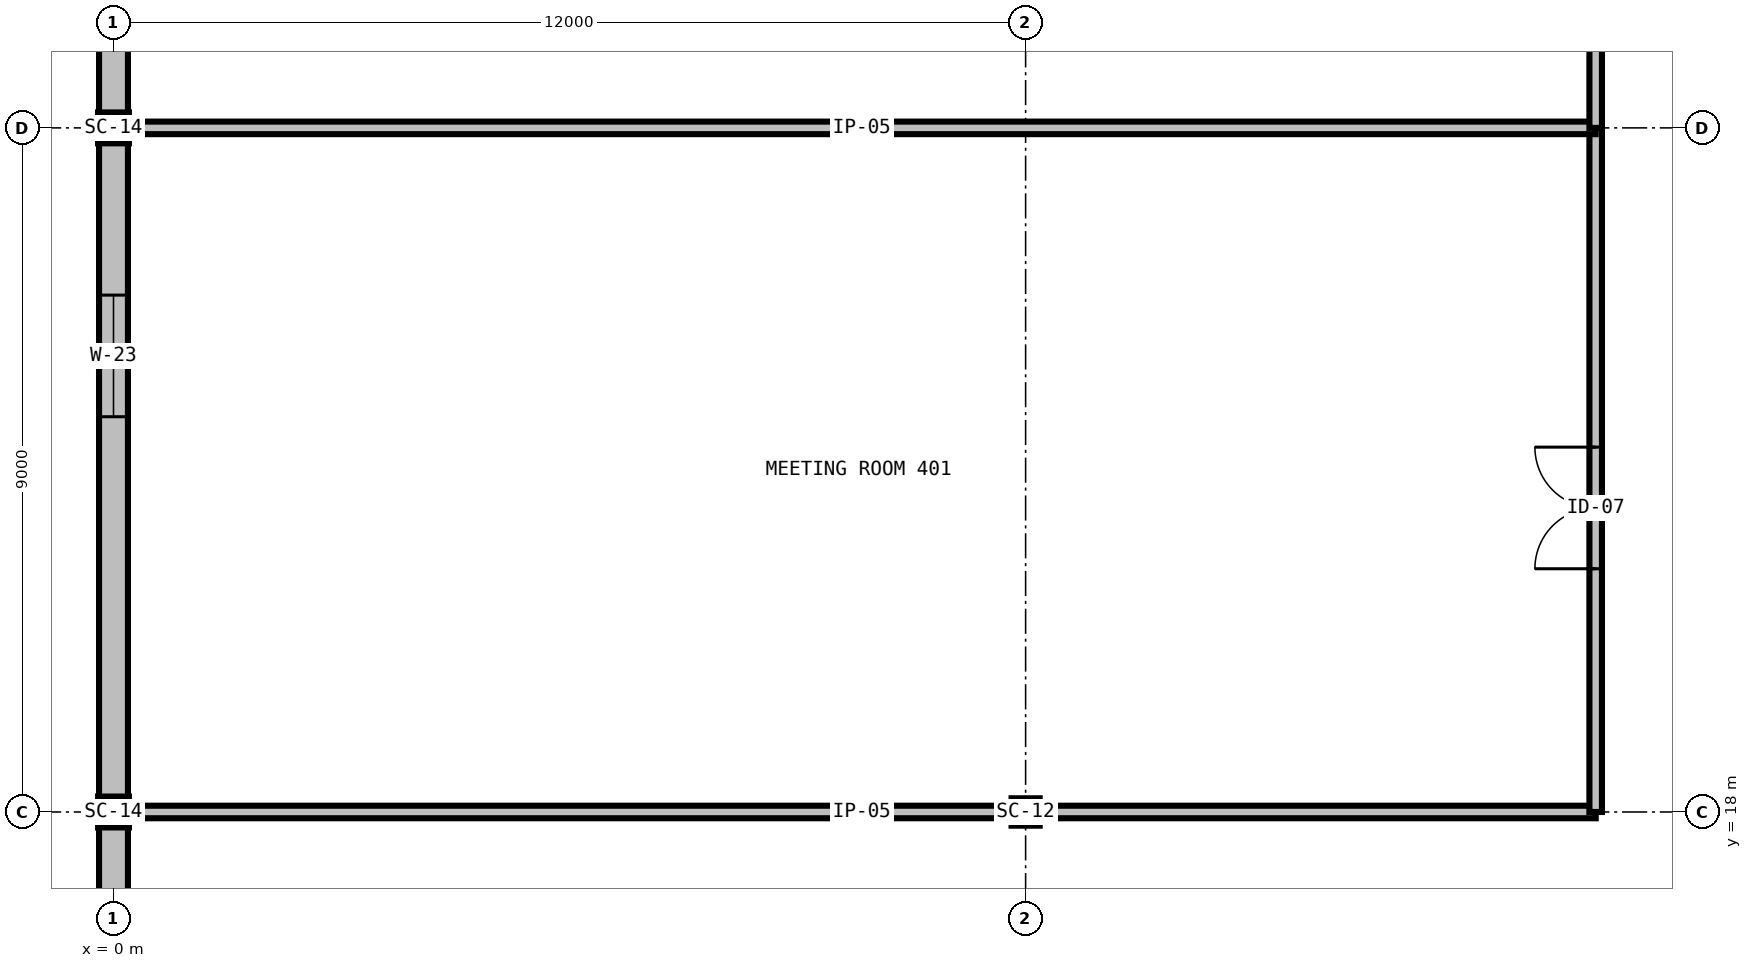
"""IFC4 building model, lengths in metres.
Left out: names, types, materials, properties, quantities, classifications, styles, units other than length and angle.
Written with IfcOpenShell. Run it as: python <this file> out.ifc"""

import sys

from ifc_helpers import new_model, si_unit, direction, frame, frame_2d, origin, origin_2d, place, context, subcontext, project, spatial, rectangle, hollow_rectangle, i_section, extrude, element, fill, save


model = new_model("IFC4")
c1 = context("Model", 3, precision=1e-05, world=origin(), true_north=direction((0.0, 1.0)))
c2 = subcontext(c1, "Body", "Model", "MODEL_VIEW")
j1 = project(units=[si_unit("LENGTHUNIT", "METRE"), si_unit("PLANEANGLEUNIT", "RADIAN")], contexts=[c1])
p1 = place(None, origin())
s1 = spatial("IfcSite", under=j1, at=p1, CompositionType="ELEMENT")
p2 = place(p1, origin())
s2 = spatial("IfcBuilding", under=s1, at=p2, CompositionType="ELEMENT")
p3 = place(p2, frame((0.0, 0.0, 23.4)))
s3 = spatial("IfcBuildingStorey", under=s2, at=p3, CompositionType="ELEMENT", Elevation=23.4)
for number, where, z_axis, x_axis in (
    (1, (0.0, 18.0, 0.0), (0.0, 0.0, 1.0), (1.0, 0.0, 0.0)),
    (2, (0.0, 27.0, 0.0), (0.0, 0.0, 1.0), (1.0, 0.0, 0.0)),
):
    element("IfcColumn", number, at=place(p3, frame(where, z_axis=z_axis, x_axis=x_axis)), inside=s3, PredefinedType="COLUMN", context=c2, shape_type="SweptSolid", body=[
        extrude(hollow_rectangle(XDim=0.406, YDim=0.406, WallThickness=0.015, at=origin_2d()), origin(), (0.0, 0.0, 1.0), 3.53),
    ])
p4 = place(p3, frame((12.0, 18.0, 0.0), z_axis=(0.0, 0.0, 1.0), x_axis=(1.0, 0.0, 0.0)))
e3 = element("IfcColumn", 3, at=p4, inside=s3, PredefinedType="COLUMN", context=c2, shape_type="SweptSolid", body=[
    extrude(i_section(OverallWidth=0.37, OverallDepth=0.36, WebThickness=0.012, FlangeThickness=0.02, FilletRadius=0.031, at=origin_2d()), origin(), (0.0, 0.0, 1.0), 3.85),
])
p5 = place(p3, frame((0.0, 18.0, 0.0), z_axis=(0.0, 0.0, 1.0), x_axis=(0.0, -1.0, 0.0)))
e4 = element("IfcWall", 4, at=p5, inside=s3, PredefinedType="STANDARD", context=c2, shape_type="SweptSolid", body=[
    extrude(rectangle(XDim=9.0, YDim=0.38, at=frame_2d((4.5, 0.0))), origin(), (0.0, 0.0, 1.0), 3.119),
])
p6 = place(p3, frame((0.0, 27.0, 0.0), z_axis=(0.0, 0.0, 1.0), x_axis=(0.0, -1.0, 0.0)))
e5 = element("IfcWall", 5, at=p6, inside=s3, PredefinedType="STANDARD", context=c2, shape_type="SweptSolid", body=[
    extrude(rectangle(XDim=9.0, YDim=0.38, at=frame_2d((4.5, 0.0))), origin(), (0.0, 0.0, 1.0), 3.119),
])
p7 = place(p6, frame((2.2, 0.0, 1.0)))
e6 = element("IfcOpeningElement", 6, at=p7, cuts=e5, PredefinedType="OPENING", context=c2, shape_type="SweptSolid", body=[
    extrude(rectangle(XDim=1.6, YDim=1.36, at=frame_2d((0.8, 0.68))), frame((0.0, 0.205, 0.0), z_axis=(0.0, -1.0, 0.0), x_axis=(1.0, 0.0, 0.0)), (0.0, 0.0, 1.0), 0.41),
])
p8 = place(p3, frame((0.0, 36.0, 0.0), z_axis=(0.0, 0.0, 1.0), x_axis=(0.0, -1.0, 0.0)))
e7 = element("IfcWall", 7, at=p8, inside=s3, PredefinedType="STANDARD", context=c2, shape_type="SweptSolid", body=[
    extrude(rectangle(XDim=9.0, YDim=0.38, at=frame_2d((4.5, 0.0))), origin(), (0.0, 0.0, 1.0), 3.119),
])
p9 = place(p8, frame((2.2, 0.0, 1.0)))
e8 = element("IfcOpeningElement", 8, at=p9, cuts=e7, PredefinedType="OPENING", context=c2, shape_type="SweptSolid", body=[
    extrude(rectangle(XDim=1.6, YDim=1.36, at=frame_2d((0.8, 0.68))), frame((0.0, 0.205, 0.0), z_axis=(0.0, -1.0, 0.0), x_axis=(1.0, 0.0, 0.0)), (0.0, 0.0, 1.0), 0.41),
])
p10 = place(p3, frame((0.14, 116.72, 3.85), z_axis=(0.0, 0.0, 1.0), x_axis=(0.0, -1.0, 0.0)))
e9 = element("IfcWall", 9, at=p10, inside=s3, PredefinedType="PARAPET", context=c2, shape_type="SweptSolid", body=[
    extrude(rectangle(XDim=116.44, YDim=0.28, at=frame_2d((58.22, 0.0))), origin(), (0.0, 0.0, 1.0), 1.2),
])
p11 = place(p3, frame((0.19, 18.0, 0.0), z_axis=(0.0, 0.0, 1.0), x_axis=(1.0, 0.0, 0.0)))
e10 = element("IfcWall", 10, at=p11, inside=s3, PredefinedType="PARTITIONING", context=c2, shape_type="SweptSolid", body=[
    extrude(rectangle(XDim=19.31, YDim=0.165, at=frame_2d((9.655, 0.0))), origin(), (0.0, 0.0, 1.0), 2.752),
])
p12 = place(p3, frame((19.5, 18.0, 0.0), z_axis=(0.0, 0.0, 1.0), x_axis=(0.0, 1.0, 0.0)))
e11 = element("IfcWall", 11, at=p12, inside=s3, PredefinedType="PARTITIONING", context=c2, shape_type="SweptSolid", body=[
    extrude(rectangle(XDim=9.0, YDim=0.165, at=frame_2d((4.5, 0.0))), origin(), (0.0, 0.0, 1.0), 3.53),
])
p13 = place(p12, frame((3.2, 0.0, 0.0)))
e12 = element("IfcOpeningElement", 12, at=p13, cuts=e11, PredefinedType="OPENING", context=c2, shape_type="SweptSolid", body=[
    extrude(rectangle(XDim=1.6, YDim=2.25, at=frame_2d((0.8, 1.125))), frame((0.0, 0.098, 0.0), z_axis=(0.0, -1.0, 0.0), x_axis=(1.0, 0.0, 0.0)), (0.0, 0.0, 1.0), 0.195),
])
p14 = place(p3, frame((19.5, 27.0, 0.0), z_axis=(0.0, 0.0, 1.0), x_axis=(-1.0, 0.0, 0.0)))
e13 = element("IfcWall", 13, at=p14, inside=s3, PredefinedType="PARTITIONING", context=c2, shape_type="SweptSolid", body=[
    extrude(rectangle(XDim=19.31, YDim=0.165, at=frame_2d((9.655, 0.0))), origin(), (0.0, 0.0, 1.0), 2.408),
])
p15 = place(p3, frame((19.5, 27.0, 0.0), z_axis=(0.0, 0.0, 1.0), x_axis=(0.0, 1.0, 0.0)))
e14 = element("IfcWall", 14, at=p15, inside=s3, PredefinedType="PARTITIONING", context=c2, shape_type="SweptSolid", body=[
    extrude(rectangle(XDim=18.0, YDim=0.165, at=frame_2d((9.0, 0.0))), origin(), (0.0, 0.0, 1.0), 3.53),
])
p16 = place(p15, frame((6.5, 0.0, 0.0)))
e15 = element("IfcOpeningElement", 15, at=p16, cuts=e14, PredefinedType="OPENING", context=c2, shape_type="SweptSolid", body=[
    extrude(rectangle(XDim=1.6, YDim=2.25, at=frame_2d((0.8, 1.125))), frame((0.0, 0.098, 0.0), z_axis=(0.0, -1.0, 0.0), x_axis=(1.0, 0.0, 0.0)), (0.0, 0.0, 1.0), 0.195),
])
p17 = place(p7, origin())
e16 = element("IfcWindow", 16, at=p17, inside=s3, PartitioningType="SINGLE_PANEL", PredefinedType="WINDOW", context=c2, shape_type="SweptSolid", body=[
    extrude(rectangle(XDim=1.6, YDim=1.36, at=frame_2d((0.8, 0.68))), frame((0.0, 0.03, 0.0), z_axis=(0.0, -1.0, 0.0), x_axis=(1.0, 0.0, 0.0)), (0.0, 0.0, 1.0), 0.06),
])
fill(e6, e16)
p18 = place(p13, origin())
e17 = element("IfcDoor", 17, at=p18, inside=s3, OperationType="DOUBLE_DOOR_SINGLE_SWING", PredefinedType="DOOR", context=c2, shape_type="SweptSolid", body=[
    extrude(rectangle(XDim=1.6, YDim=2.25, at=frame_2d((0.8, 1.125))), frame((0.0, 0.025, 0.0), z_axis=(0.0, -1.0, 0.0), x_axis=(1.0, 0.0, 0.0)), (0.0, 0.0, 1.0), 0.05),
])
fill(e12, e17)
save(model, sys.argv[1])
